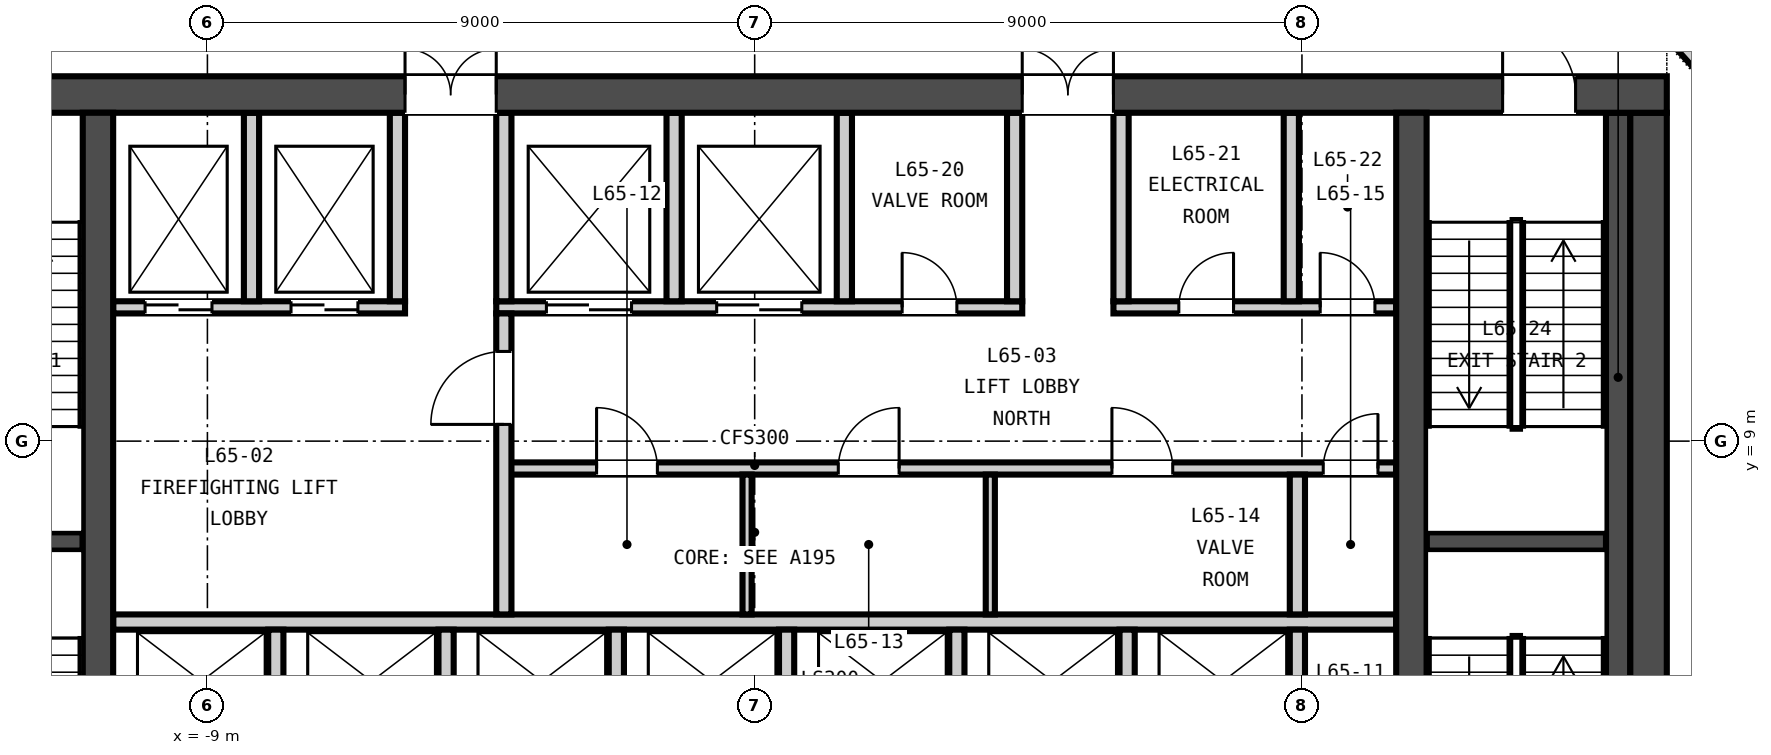
"""IFC4 building model, lengths in metres.
Left out: names, types, materials, properties, quantities, classifications, styles, units other than length and angle.
Written with IfcOpenShell. Run it as: python <this file> out.ifc"""

import sys

from ifc_helpers import new_model, si_unit, direction, frame, frame_2d, origin, place, context, subcontext, project, spatial, rectangle, extrude, element, fill, save


model = new_model("IFC4")
c1 = context("Model", 3, precision=1e-05, world=origin(), true_north=direction((0.0, 1.0)))
c2 = subcontext(c1, "Body", "Model", "MODEL_VIEW")
j1 = project(units=[si_unit("LENGTHUNIT", "METRE"), si_unit("PLANEANGLEUNIT", "RADIAN")], contexts=[c1])
p1 = place(None, origin())
s1 = spatial("IfcSite", under=j1, at=p1, CompositionType="ELEMENT")
p2 = place(p1, origin())
s2 = spatial("IfcBuilding", under=s1, at=p2, CompositionType="ELEMENT")
p3 = place(p2, frame((0.0, 0.0, 256.45)))
s3 = spatial("IfcBuildingStorey", under=s2, at=p3, CompositionType="ELEMENT", Elevation=256.45)
p4 = place(p3, frame((-15.0, 14.7, -0.3), z_axis=(0.0, 0.0, 1.0), x_axis=(1.0, 0.0, 0.0)))
e1 = element("IfcWall", 1, at=p4, inside=s3, PredefinedType="SOLIDWALL", context=c2, shape_type="SweptSolid", body=[
    extrude(rectangle(XDim=30.0, YDim=0.6, at=frame_2d((15.0, 0.0))), origin(), (0.0, 0.0, 1.0), 4.65),
])
p5 = place(p4, frame((9.25, 0.0, 0.3)))
e2 = element("IfcOpeningElement", 2, at=p5, cuts=e1, PredefinedType="OPENING", context=c2, shape_type="SweptSolid", body=[
    extrude(rectangle(XDim=1.5, YDim=2.1, at=frame_2d((0.75, 1.05))), frame((0.0, 0.31, 0.0), z_axis=(0.0, -1.0, 0.0), x_axis=(1.0, 0.0, 0.0)), (0.0, 0.0, 1.0), 0.62),
])
p6 = place(p4, frame((19.4, 0.0, 0.3)))
e3 = element("IfcOpeningElement", 3, at=p6, cuts=e1, PredefinedType="OPENING", context=c2, shape_type="SweptSolid", body=[
    extrude(rectangle(XDim=1.5, YDim=2.1, at=frame_2d((0.75, 1.05))), frame((0.0, 0.31, 0.0), z_axis=(0.0, -1.0, 0.0), x_axis=(1.0, 0.0, 0.0)), (0.0, 0.0, 1.0), 0.62),
])
p7 = place(p4, frame((1.5, 0.0, 0.3)))
e4 = element("IfcOpeningElement", 4, at=p7, cuts=e1, PredefinedType="OPENING", context=c2, shape_type="SweptSolid", body=[
    extrude(rectangle(XDim=1.2, YDim=2.1, at=frame_2d((0.6, 1.05))), frame((0.0, 0.31, 0.0), z_axis=(0.0, -1.0, 0.0), x_axis=(1.0, 0.0, 0.0)), (0.0, 0.0, 1.0), 0.62),
])
p8 = place(p4, frame((27.3, 0.0, 0.3)))
e5 = element("IfcOpeningElement", 5, at=p8, cuts=e1, PredefinedType="OPENING", context=c2, shape_type="SweptSolid", body=[
    extrude(rectangle(XDim=1.2, YDim=2.1, at=frame_2d((0.6, 1.05))), frame((0.0, 0.31, 0.0), z_axis=(0.0, -1.0, 0.0), x_axis=(1.0, 0.0, 0.0)), (0.0, 0.0, 1.0), 0.62),
])
p9 = place(p3, frame((14.7, 0.6, -0.3), z_axis=(0.0, 0.0, 1.0), x_axis=(0.0, 1.0, 0.0)))
e6 = element("IfcWall", 6, at=p9, inside=s3, PredefinedType="SOLIDWALL", context=c2, shape_type="SweptSolid", body=[
    extrude(rectangle(XDim=13.8, YDim=0.6, at=frame_2d((6.9, 0.0))), origin(), (0.0, 0.0, 1.0), 4.65),
])
for number, where, z_axis, x_axis in (
    (7, (-10.8, 0.6, -0.3), (0.0, 0.0, 1.0), (0.0, 1.0, 0.0)),
    (8, (10.8, 0.6, -0.3), (0.0, 0.0, 1.0), (0.0, 1.0, 0.0)),
):
    element("IfcWall", number, at=place(p3, frame(where, z_axis=z_axis, x_axis=x_axis)), inside=s3, PredefinedType="SOLIDWALL", context=c2, shape_type="SweptSolid", body=[
        extrude(rectangle(XDim=13.8, YDim=0.5, at=frame_2d((6.9, 0.0))), origin(), (0.0, 0.0, 1.0), 4.65),
    ])
p10 = place(p3, frame((-10.55, 6.025, 0.0), z_axis=(0.0, 0.0, 1.0), x_axis=(1.0, 0.0, 0.0)))
e9 = element("IfcWall", 9, at=p10, inside=s3, PredefinedType="PARTITIONING", context=c2, shape_type="SweptSolid", body=[
    extrude(rectangle(XDim=21.1, YDim=0.25, at=frame_2d((10.55, 0.0))), origin(), (0.0, 0.0, 1.0), 4.35),
])
p11 = place(p3, frame((-4.125, 8.55, 0.0), z_axis=(0.0, 0.0, 1.0), x_axis=(1.0, 0.0, 0.0)))
e10 = element("IfcWall", 10, at=p11, inside=s3, PredefinedType="PARTITIONING", context=c2, shape_type="SweptSolid", body=[
    extrude(rectangle(XDim=14.675, YDim=0.2, at=frame_2d((7.337, 0.0))), origin(), (0.0, 0.0, 1.0), 4.35),
])
p12 = place(p11, frame((1.525, 0.0, 0.0)))
e11 = element("IfcOpeningElement", 11, at=p12, cuts=e10, PredefinedType="OPENING", context=c2, shape_type="SweptSolid", body=[
    extrude(rectangle(XDim=1.0, YDim=2.1, at=frame_2d((0.5, 1.05))), frame((0.0, 0.11, 0.0), z_axis=(0.0, -1.0, 0.0), x_axis=(1.0, 0.0, 0.0)), (0.0, 0.0, 1.0), 0.22),
])
p13 = place(p11, frame((5.5, 0.0, 0.0)))
e12 = element("IfcOpeningElement", 12, at=p13, cuts=e10, PredefinedType="OPENING", context=c2, shape_type="SweptSolid", body=[
    extrude(rectangle(XDim=1.0, YDim=2.1, at=frame_2d((0.5, 1.05))), frame((0.0, 0.11, 0.0), z_axis=(0.0, -1.0, 0.0), x_axis=(1.0, 0.0, 0.0)), (0.0, 0.0, 1.0), 0.22),
])
p14 = place(p11, frame((10.0, 0.0, 0.0)))
e13 = element("IfcOpeningElement", 13, at=p14, cuts=e10, PredefinedType="OPENING", context=c2, shape_type="SweptSolid", body=[
    extrude(rectangle(XDim=1.0, YDim=2.1, at=frame_2d((0.5, 1.05))), frame((0.0, 0.11, 0.0), z_axis=(0.0, -1.0, 0.0), x_axis=(1.0, 0.0, 0.0)), (0.0, 0.0, 1.0), 0.22),
])
p15 = place(p11, frame((13.475, 0.0, 0.0)))
e14 = element("IfcOpeningElement", 14, at=p15, cuts=e10, PredefinedType="OPENING", context=c2, shape_type="SweptSolid", body=[
    extrude(rectangle(XDim=0.9, YDim=2.1, at=frame_2d((0.45, 1.05))), frame((0.0, 0.11, 0.0), z_axis=(0.0, -1.0, 0.0), x_axis=(1.0, 0.0, 0.0)), (0.0, 0.0, 1.0), 0.22),
])
p16 = place(p3, frame((-10.55, 11.2, 0.0), z_axis=(0.0, 0.0, 1.0), x_axis=(1.0, 0.0, 0.0)))
e15 = element("IfcWall", 15, at=p16, inside=s3, PredefinedType="PARTITIONING", context=c2, shape_type="SweptSolid", body=[
    extrude(rectangle(XDim=4.8, YDim=0.2, at=frame_2d((2.4, 0.0))), origin(), (0.0, 0.0, 1.0), 4.35),
])
p17 = place(p16, frame((0.525, 0.0, 0.0)))
e16 = element("IfcOpeningElement", 16, at=p17, cuts=e15, PredefinedType="OPENING", context=c2, shape_type="SweptSolid", body=[
    extrude(rectangle(XDim=1.1, YDim=2.1, at=frame_2d((0.55, 1.05))), frame((0.0, 0.11, 0.0), z_axis=(0.0, -1.0, 0.0), x_axis=(1.0, 0.0, 0.0)), (0.0, 0.0, 1.0), 0.22),
])
p18 = place(p16, frame((2.925, 0.0, 0.0)))
e17 = element("IfcOpeningElement", 17, at=p18, cuts=e15, PredefinedType="OPENING", context=c2, shape_type="SweptSolid", body=[
    extrude(rectangle(XDim=1.1, YDim=2.1, at=frame_2d((0.55, 1.05))), frame((0.0, 0.11, 0.0), z_axis=(0.0, -1.0, 0.0), x_axis=(1.0, 0.0, 0.0)), (0.0, 0.0, 1.0), 0.22),
])
p19 = place(p3, frame((-4.25, 11.2, 0.0), z_axis=(0.0, 0.0, 1.0), x_axis=(1.0, 0.0, 0.0)))
e18 = element("IfcWall", 18, at=p19, inside=s3, PredefinedType="PARTITIONING", context=c2, shape_type="SweptSolid", body=[
    extrude(rectangle(XDim=8.65, YDim=0.2, at=frame_2d((4.325, 0.0))), origin(), (0.0, 0.0, 1.0), 4.35),
])
p20 = place(p19, frame((0.825, 0.0, 0.0)))
e19 = element("IfcOpeningElement", 19, at=p20, cuts=e18, PredefinedType="OPENING", context=c2, shape_type="SweptSolid", body=[
    extrude(rectangle(XDim=1.4, YDim=2.1, at=frame_2d((0.7, 1.05))), frame((0.0, 0.11, 0.0), z_axis=(0.0, -1.0, 0.0), x_axis=(1.0, 0.0, 0.0)), (0.0, 0.0, 1.0), 0.22),
])
p21 = place(p19, frame((3.625, 0.0, 0.0)))
e20 = element("IfcOpeningElement", 20, at=p21, cuts=e18, PredefinedType="OPENING", context=c2, shape_type="SweptSolid", body=[
    extrude(rectangle(XDim=1.4, YDim=2.1, at=frame_2d((0.7, 1.05))), frame((0.0, 0.11, 0.0), z_axis=(0.0, -1.0, 0.0), x_axis=(1.0, 0.0, 0.0)), (0.0, 0.0, 1.0), 0.22),
])
p22 = place(p19, frame((6.675, 0.0, 0.0)))
e21 = element("IfcOpeningElement", 21, at=p22, cuts=e18, PredefinedType="OPENING", context=c2, shape_type="SweptSolid", body=[
    extrude(rectangle(XDim=0.9, YDim=2.1, at=frame_2d((0.45, 1.05))), frame((0.0, 0.11, 0.0), z_axis=(0.0, -1.0, 0.0), x_axis=(1.0, 0.0, 0.0)), (0.0, 0.0, 1.0), 0.22),
])
p23 = place(p3, frame((5.9, 11.2, 0.0), z_axis=(0.0, 0.0, 1.0), x_axis=(1.0, 0.0, 0.0)))
e22 = element("IfcWall", 22, at=p23, inside=s3, PredefinedType="PARTITIONING", context=c2, shape_type="SweptSolid", body=[
    extrude(rectangle(XDim=4.65, YDim=0.2, at=frame_2d((2.325, 0.0))), origin(), (0.0, 0.0, 1.0), 4.35),
])
p24 = place(p23, frame((1.075, 0.0, 0.0)))
e23 = element("IfcOpeningElement", 23, at=p24, cuts=e22, PredefinedType="OPENING", context=c2, shape_type="SweptSolid", body=[
    extrude(rectangle(XDim=0.9, YDim=2.1, at=frame_2d((0.45, 1.05))), frame((0.0, 0.11, 0.0), z_axis=(0.0, -1.0, 0.0), x_axis=(1.0, 0.0, 0.0)), (0.0, 0.0, 1.0), 0.22),
])
p25 = place(p23, frame((3.4, 0.0, 0.0)))
e24 = element("IfcOpeningElement", 24, at=p25, cuts=e22, PredefinedType="OPENING", context=c2, shape_type="SweptSolid", body=[
    extrude(rectangle(XDim=0.9, YDim=2.1, at=frame_2d((0.45, 1.05))), frame((0.0, 0.11, 0.0), z_axis=(0.0, -1.0, 0.0), x_axis=(1.0, 0.0, 0.0)), (0.0, 0.0, 1.0), 0.22),
])
p26 = place(p3, frame((-4.125, 6.15, 0.0), z_axis=(0.0, 0.0, 1.0), x_axis=(0.0, 1.0, 0.0)))
e25 = element("IfcWall", 25, at=p26, inside=s3, PredefinedType="PARTITIONING", context=c2, shape_type="SweptSolid", body=[
    extrude(rectangle(XDim=4.95, YDim=0.25, at=frame_2d((2.475, 0.0))), origin(), (0.0, 0.0, 1.0), 4.35),
])
p27 = place(p26, frame((3.125, 0.0, 0.0)))
e26 = element("IfcOpeningElement", 26, at=p27, cuts=e25, PredefinedType="OPENING", context=c2, shape_type="SweptSolid", body=[
    extrude(rectangle(XDim=1.2, YDim=2.1, at=frame_2d((0.6, 1.05))), frame((0.0, 0.135, 0.0), z_axis=(0.0, -1.0, 0.0), x_axis=(1.0, 0.0, 0.0)), (0.0, 0.0, 1.0), 0.27),
])
for number, where, z_axis, x_axis in (
    (27, (-7.875, 3.6, 0.0), (0.0, 0.0, 1.0), (0.0, 1.0, 0.0)),
    (28, (-5.075, 3.6, 0.0), (0.0, 0.0, 1.0), (0.0, 1.0, 0.0)),
    (29, (-2.275, 3.6, 0.0), (0.0, 0.0, 1.0), (0.0, 1.0, 0.0)),
    (30, (0.525, 3.6, 0.0), (0.0, 0.0, 1.0), (0.0, 1.0, 0.0)),
    (31, (3.325, 3.6, 0.0), (0.0, 0.0, 1.0), (0.0, 1.0, 0.0)),
    (32, (6.125, 3.6, 0.0), (0.0, 0.0, 1.0), (0.0, 1.0, 0.0)),
    (33, (8.925, 3.6, 0.0), (0.0, 0.0, 1.0), (0.0, 1.0, 0.0)),
):
    element("IfcWall", number, at=place(p3, frame(where, z_axis=z_axis, x_axis=x_axis)), inside=s3, PredefinedType="PARTITIONING", context=c2, shape_type="SweptSolid", body=[
        extrude(rectangle(XDim=2.3, YDim=0.25, at=frame_2d((1.15, 0.0))), origin(), (0.0, 0.0, 1.0), 4.35),
    ])
for number, where, z_axis, x_axis in (
    (34, (-0.125, 6.15, 0.0), (0.0, 0.0, 1.0), (0.0, 1.0, 0.0)),
    (35, (3.875, 6.15, 0.0), (0.0, 0.0, 1.0), (0.0, 1.0, 0.0)),
):
    element("IfcWall", number, at=place(p3, frame(where, z_axis=z_axis, x_axis=x_axis)), inside=s3, PredefinedType="PARTITIONING", context=c2, shape_type="SweptSolid", body=[
        extrude(rectangle(XDim=2.3, YDim=0.15, at=frame_2d((1.15, 0.0))), origin(), (0.0, 0.0, 1.0), 4.35),
    ])
p28 = place(p3, frame((8.925, 6.15, 0.0), z_axis=(0.0, 0.0, 1.0), x_axis=(0.0, 1.0, 0.0)))
e36 = element("IfcWall", 36, at=p28, inside=s3, PredefinedType="PARTITIONING", context=c2, shape_type="SweptSolid", body=[
    extrude(rectangle(XDim=2.3, YDim=0.25, at=frame_2d((1.15, 0.0))), origin(), (0.0, 0.0, 1.0), 4.35),
])
for number, where, z_axis, x_axis in (
    (37, (-8.275, 11.3, 0.0), (0.0, 0.0, 1.0), (0.0, 1.0, 0.0)),
    (38, (-5.875, 11.3, 0.0), (0.0, 0.0, 1.0), (0.0, 1.0, 0.0)),
    (39, (-4.125, 11.3, 0.0), (0.0, 0.0, 1.0), (0.0, 1.0, 0.0)),
    (40, (-1.325, 11.3, 0.0), (0.0, 0.0, 1.0), (0.0, 1.0, 0.0)),
    (41, (1.475, 11.3, 0.0), (0.0, 0.0, 1.0), (0.0, 1.0, 0.0)),
    (42, (4.275, 11.3, 0.0), (0.0, 0.0, 1.0), (0.0, 1.0, 0.0)),
    (43, (6.025, 11.3, 0.0), (0.0, 0.0, 1.0), (0.0, 1.0, 0.0)),
    (44, (8.825, 11.3, 0.0), (0.0, 0.0, 1.0), (0.0, 1.0, 0.0)),
):
    element("IfcWall", number, at=place(p3, frame(where, z_axis=z_axis, x_axis=x_axis)), inside=s3, PredefinedType="PARTITIONING", context=c2, shape_type="SweptSolid", body=[
        extrude(rectangle(XDim=3.1, YDim=0.25, at=frame_2d((1.55, 0.0))), origin(), (0.0, 0.0, 1.0), 4.35),
    ])
for number, where, z_axis, x_axis in (
    (45, (-14.0, 7.35, 0.0), (0.0, 0.0, 1.0), (1.0, 0.0, 0.0)),
    (46, (11.05, 7.35, 0.0), (0.0, 0.0, 1.0), (1.0, 0.0, 0.0)),
):
    element("IfcWall", number, at=place(p3, frame(where, z_axis=z_axis, x_axis=x_axis)), inside=s3, PredefinedType="SOLIDWALL", context=c2, shape_type="SweptSolid", body=[
        extrude(rectangle(XDim=2.95, YDim=0.3, at=frame_2d((1.475, 0.0))), origin(), (0.0, 0.0, 1.0), 4.35),
    ])
p29 = place(p3, frame((14.2, 0.6, 0.0), z_axis=(0.0, 0.0, 1.0), x_axis=(0.0, 1.0, 0.0)))
e47 = element("IfcWall", 47, at=p29, inside=s3, PredefinedType="SOLIDWALL", context=c2, shape_type="SweptSolid", body=[
    extrude(rectangle(XDim=13.8, YDim=0.4, at=frame_2d((6.9, 0.0))), origin(), (0.0, 0.0, 1.0), 4.35),
])
p30 = place(p3, frame((10.326, 20.968, 0.0), z_axis=(0.0, 0.0, 1.0), x_axis=(0.669133107761, -0.743142573197, 0.0)))
e48 = element("IfcWall", 48, at=p30, inside=s3, PredefinedType="PARTITIONING", context=c2, shape_type="SweptSolid", body=[
    extrude(rectangle(XDim=24.431, YDim=0.2, at=frame_2d((12.215, 0.0))), origin(), (0.0, 0.0, 1.0), 4.35),
])
p31 = place(p27, origin())
e49 = element("IfcDoor", 49, at=p31, inside=s3, OperationType="SINGLE_SWING_LEFT", PredefinedType="DOOR", context=c2, shape_type="SweptSolid", body=[
    extrude(rectangle(XDim=1.2, YDim=2.1, at=frame_2d((0.6, 1.05))), frame((0.0, 0.025, 0.0), z_axis=(0.0, -1.0, 0.0), x_axis=(1.0, 0.0, 0.0)), (0.0, 0.0, 1.0), 0.05),
])
fill(e26, e49)
p32 = place(p12, origin())
e50 = element("IfcDoor", 50, at=p32, inside=s3, OperationType="SINGLE_SWING_LEFT", PredefinedType="DOOR", context=c2, shape_type="SweptSolid", body=[
    extrude(rectangle(XDim=1.0, YDim=2.1, at=frame_2d((0.5, 1.05))), frame((0.0, 0.025, 0.0), z_axis=(0.0, -1.0, 0.0), x_axis=(1.0, 0.0, 0.0)), (0.0, 0.0, 1.0), 0.05),
])
fill(e11, e50)
p33 = place(p13, origin())
e51 = element("IfcDoor", 51, at=p33, inside=s3, OperationType="SINGLE_SWING_RIGHT", PredefinedType="DOOR", context=c2, shape_type="SweptSolid", body=[
    extrude(rectangle(XDim=1.0, YDim=2.1, at=frame_2d((0.5, 1.05))), frame((0.0, 0.025, 0.0), z_axis=(0.0, -1.0, 0.0), x_axis=(1.0, 0.0, 0.0)), (0.0, 0.0, 1.0), 0.05),
])
fill(e12, e51)
p34 = place(p14, origin())
e52 = element("IfcDoor", 52, at=p34, inside=s3, OperationType="SINGLE_SWING_LEFT", PredefinedType="DOOR", context=c2, shape_type="SweptSolid", body=[
    extrude(rectangle(XDim=1.0, YDim=2.1, at=frame_2d((0.5, 1.05))), frame((0.0, 0.025, 0.0), z_axis=(0.0, -1.0, 0.0), x_axis=(1.0, 0.0, 0.0)), (0.0, 0.0, 1.0), 0.05),
])
fill(e13, e52)
p35 = place(p15, origin())
e53 = element("IfcDoor", 53, at=p35, inside=s3, OperationType="SINGLE_SWING_RIGHT", PredefinedType="DOOR", context=c2, shape_type="SweptSolid", body=[
    extrude(rectangle(XDim=0.9, YDim=2.1, at=frame_2d((0.45, 1.05))), frame((0.0, 0.025, 0.0), z_axis=(0.0, -1.0, 0.0), x_axis=(1.0, 0.0, 0.0)), (0.0, 0.0, 1.0), 0.05),
])
fill(e14, e53)
p36 = place(p17, origin())
e54 = element("IfcDoor", 54, at=p36, inside=s3, OperationType="DOUBLE_DOOR_SLIDING", PredefinedType="DOOR", context=c2, shape_type="SweptSolid", body=[
    extrude(rectangle(XDim=1.1, YDim=2.1, at=frame_2d((0.55, 1.05))), frame((0.0, 0.025, 0.0), z_axis=(0.0, -1.0, 0.0), x_axis=(1.0, 0.0, 0.0)), (0.0, 0.0, 1.0), 0.05),
])
fill(e16, e54)
p37 = place(p18, origin())
e55 = element("IfcDoor", 55, at=p37, inside=s3, OperationType="DOUBLE_DOOR_SLIDING", PredefinedType="DOOR", context=c2, shape_type="SweptSolid", body=[
    extrude(rectangle(XDim=1.1, YDim=2.1, at=frame_2d((0.55, 1.05))), frame((0.0, 0.025, 0.0), z_axis=(0.0, -1.0, 0.0), x_axis=(1.0, 0.0, 0.0)), (0.0, 0.0, 1.0), 0.05),
])
fill(e17, e55)
p38 = place(p20, origin())
e56 = element("IfcDoor", 56, at=p38, inside=s3, OperationType="DOUBLE_DOOR_SLIDING", PredefinedType="DOOR", context=c2, shape_type="SweptSolid", body=[
    extrude(rectangle(XDim=1.4, YDim=2.1, at=frame_2d((0.7, 1.05))), frame((0.0, 0.025, 0.0), z_axis=(0.0, -1.0, 0.0), x_axis=(1.0, 0.0, 0.0)), (0.0, 0.0, 1.0), 0.05),
])
fill(e19, e56)
p39 = place(p21, origin())
e57 = element("IfcDoor", 57, at=p39, inside=s3, OperationType="DOUBLE_DOOR_SLIDING", PredefinedType="DOOR", context=c2, shape_type="SweptSolid", body=[
    extrude(rectangle(XDim=1.4, YDim=2.1, at=frame_2d((0.7, 1.05))), frame((0.0, 0.025, 0.0), z_axis=(0.0, -1.0, 0.0), x_axis=(1.0, 0.0, 0.0)), (0.0, 0.0, 1.0), 0.05),
])
fill(e20, e57)
p40 = place(p22, origin())
e58 = element("IfcDoor", 58, at=p40, inside=s3, OperationType="SINGLE_SWING_LEFT", PredefinedType="DOOR", context=c2, shape_type="SweptSolid", body=[
    extrude(rectangle(XDim=0.9, YDim=2.1, at=frame_2d((0.45, 1.05))), frame((0.0, 0.025, 0.0), z_axis=(0.0, -1.0, 0.0), x_axis=(1.0, 0.0, 0.0)), (0.0, 0.0, 1.0), 0.05),
])
fill(e21, e58)
p41 = place(p24, origin())
e59 = element("IfcDoor", 59, at=p41, inside=s3, OperationType="SINGLE_SWING_RIGHT", PredefinedType="DOOR", context=c2, shape_type="SweptSolid", body=[
    extrude(rectangle(XDim=0.9, YDim=2.1, at=frame_2d((0.45, 1.05))), frame((0.0, 0.025, 0.0), z_axis=(0.0, -1.0, 0.0), x_axis=(1.0, 0.0, 0.0)), (0.0, 0.0, 1.0), 0.05),
])
fill(e23, e59)
p42 = place(p25, origin())
e60 = element("IfcDoor", 60, at=p42, inside=s3, OperationType="SINGLE_SWING_LEFT", PredefinedType="DOOR", context=c2, shape_type="SweptSolid", body=[
    extrude(rectangle(XDim=0.9, YDim=2.1, at=frame_2d((0.45, 1.05))), frame((0.0, 0.025, 0.0), z_axis=(0.0, -1.0, 0.0), x_axis=(1.0, 0.0, 0.0)), (0.0, 0.0, 1.0), 0.05),
])
fill(e24, e60)
p43 = place(p5, origin())
e61 = element("IfcDoor", 61, at=p43, inside=s3, OperationType="DOUBLE_DOOR_SINGLE_SWING", PredefinedType="DOOR", context=c2, shape_type="SweptSolid", body=[
    extrude(rectangle(XDim=1.5, YDim=2.1, at=frame_2d((0.75, 1.05))), frame((0.0, 0.025, 0.0), z_axis=(0.0, -1.0, 0.0), x_axis=(1.0, 0.0, 0.0)), (0.0, 0.0, 1.0), 0.05),
])
fill(e2, e61)
p44 = place(p6, origin())
e62 = element("IfcDoor", 62, at=p44, inside=s3, OperationType="DOUBLE_DOOR_SINGLE_SWING", PredefinedType="DOOR", context=c2, shape_type="SweptSolid", body=[
    extrude(rectangle(XDim=1.5, YDim=2.1, at=frame_2d((0.75, 1.05))), frame((0.0, 0.025, 0.0), z_axis=(0.0, -1.0, 0.0), x_axis=(1.0, 0.0, 0.0)), (0.0, 0.0, 1.0), 0.05),
])
fill(e3, e62)
p45 = place(p8, origin())
e63 = element("IfcDoor", 63, at=p45, inside=s3, OperationType="SINGLE_SWING_LEFT", PredefinedType="DOOR", context=c2, shape_type="SweptSolid", body=[
    extrude(rectangle(XDim=1.2, YDim=2.1, at=frame_2d((0.6, 1.05))), frame((0.0, 0.025, 0.0), z_axis=(0.0, -1.0, 0.0), x_axis=(1.0, 0.0, 0.0)), (0.0, 0.0, 1.0), 0.05),
])
fill(e5, e63)
save(model, sys.argv[1])
